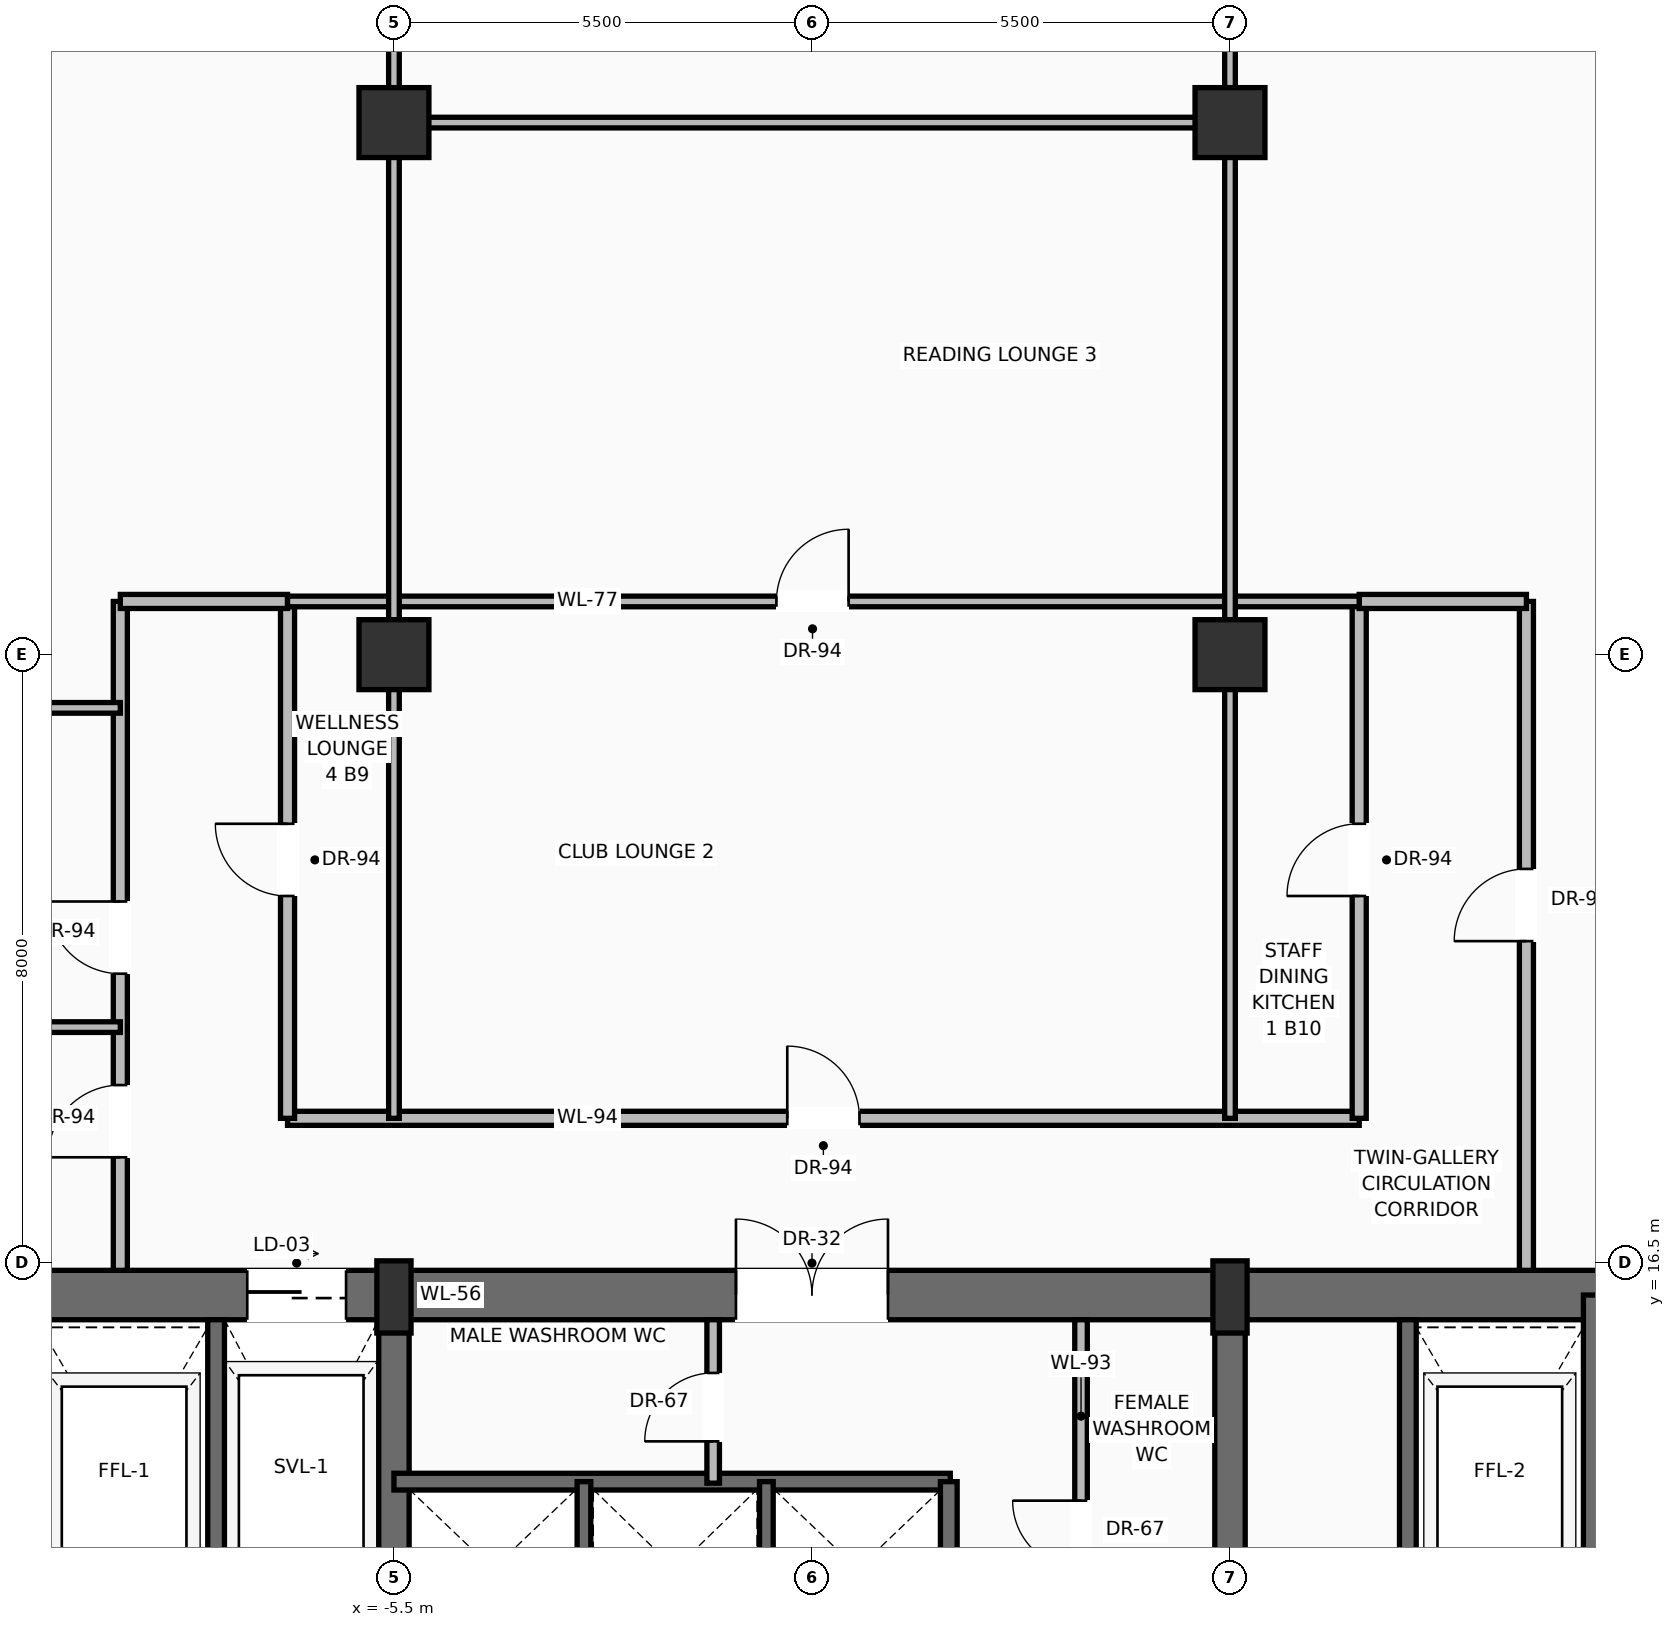
"""IFC4 building model, lengths in metres.
Left out: names, types, materials, properties, quantities, classifications, styles, units other than length and angle.
Written with IfcOpenShell. Run it as: python <this file> out.ifc"""

import sys

from ifc_helpers import new_model, si_unit, direction, frame, frame_2d, origin, origin_2d, place, context, subcontext, project, spatial, rectangle, extrude, source, transform, mapped, element, fill, save


model = new_model("IFC4")
c1 = context("Model", 3, precision=1e-05, world=origin(), true_north=direction((0.0, 1.0)))
c2 = subcontext(c1, "Body", "Model", "MODEL_VIEW")
j1 = project(units=[si_unit("LENGTHUNIT", "METRE"), si_unit("PLANEANGLEUNIT", "RADIAN")], contexts=[c1])
p1 = place(None, origin())
s1 = spatial("IfcSite", under=j1, at=p1, CompositionType="ELEMENT")
p2 = place(p1, origin())
s2 = spatial("IfcBuilding", under=s1, at=p2, CompositionType="ELEMENT")
p3 = place(p2, frame((0.0, 0.0, 155.2)))
s3 = spatial("IfcBuildingStorey", under=s2, at=p3, CompositionType="ELEMENT", Elevation=155.2)
p4 = place(p3, frame((-10.8, 16.075, 0.0), z_axis=(0.0, 0.0, 1.0), x_axis=(1.0, 0.0, 0.0)))
e1 = element("IfcWall", 1, at=p4, inside=s3, PredefinedType="SHEAR", context=c2, shape_type="SweptSolid", body=[
    extrude(rectangle(XDim=21.6, YDim=0.65, at=frame_2d((10.8, 0.0))), origin(), (0.0, 0.0, 1.0), 3.47),
])
p5 = place(p4, frame((3.37, 0.0, 0.0)))
e2 = element("IfcOpeningElement", 2, at=p5, cuts=e1, PredefinedType="OPENING", context=c2, shape_type="SweptSolid", body=[
    extrude(rectangle(XDim=1.3, YDim=2.3, at=frame_2d((0.65, 1.15))), frame((0.0, 0.335, 0.0), z_axis=(0.0, -1.0, 0.0), x_axis=(1.0, 0.0, 0.0)), (0.0, 0.0, 1.0), 0.67),
])
p6 = place(p4, frame((9.8, 0.0, 0.0)))
e3 = element("IfcOpeningElement", 3, at=p6, cuts=e1, PredefinedType="OPENING", context=c2, shape_type="SweptSolid", body=[
    extrude(rectangle(XDim=2.0, YDim=2.4, at=frame_2d((1.0, 1.2))), frame((0.0, 0.335, 0.0), z_axis=(0.0, -1.0, 0.0), x_axis=(1.0, 0.0, 0.0)), (0.0, 0.0, 1.0), 0.67),
])
p7 = place(p3, frame((10.475, 0.525, 0.0), z_axis=(0.0, 0.0, 1.0), x_axis=(0.0, 1.0, 0.0)))
e4 = element("IfcWall", 4, at=p7, inside=s3, PredefinedType="SHEAR", context=c2, shape_type="SweptSolid", body=[
    extrude(rectangle(XDim=15.55, YDim=0.65, at=frame_2d((7.775, 0.0))), origin(), (0.0, 0.0, 1.0), 3.47),
])
p8 = place(p3, frame((-5.5, 0.525, 0.0), z_axis=(0.0, 0.0, 1.0), x_axis=(0.0, 1.0, 0.0)))
e5 = element("IfcWall", 5, at=p8, inside=s3, PredefinedType="SHEAR", context=c2, shape_type="SweptSolid", body=[
    extrude(rectangle(XDim=15.55, YDim=0.4, at=frame_2d((7.775, 0.0))), origin(), (0.0, 0.0, 1.0), 3.47),
])
p9 = place(p8, frame((8.975, 0.0, 0.0)))
e6 = element("IfcOpeningElement", 6, at=p9, cuts=e5, PredefinedType="OPENING", context=c2, shape_type="SweptSolid", body=[
    extrude(rectangle(XDim=1.1, YDim=2.2, at=frame_2d((0.55, 1.1))), frame((0.0, 0.21, 0.0), z_axis=(0.0, -1.0, 0.0), x_axis=(1.0, 0.0, 0.0)), (0.0, 0.0, 1.0), 0.42),
])
p10 = place(p3, frame((5.5, 0.525, 0.0), z_axis=(0.0, 0.0, 1.0), x_axis=(0.0, 1.0, 0.0)))
e7 = element("IfcWall", 7, at=p10, inside=s3, PredefinedType="SHEAR", context=c2, shape_type="SweptSolid", body=[
    extrude(rectangle(XDim=15.55, YDim=0.4, at=frame_2d((7.775, 0.0))), origin(), (0.0, 0.0, 1.0), 3.47),
])
p11 = place(p10, frame((8.975, 0.0, 0.0)))
e8 = element("IfcOpeningElement", 8, at=p11, cuts=e7, PredefinedType="OPENING", context=c2, shape_type="SweptSolid", body=[
    extrude(rectangle(XDim=1.1, YDim=2.2, at=frame_2d((0.55, 1.1))), frame((0.0, 0.21, 0.0), z_axis=(0.0, -1.0, 0.0), x_axis=(1.0, 0.0, 0.0)), (0.0, 0.0, 1.0), 0.42),
])
m1 = source(origin(), c2, "Body", "SweptSolid", [
    extrude(rectangle(XDim=0.45, YDim=0.95, at=origin_2d()), origin(), (0.0, 0.0, 1.0), 3.7),
])
for number, where, z_axis, x_axis in (
    (9, (-5.5, 16.05, 0.0), (0.0, 0.0, 1.0), (1.0, 0.0, 0.0)),
    (10, (5.5, 16.05, 0.0), (0.0, 0.0, 1.0), (1.0, 0.0, 0.0)),
):
    element("IfcColumn", number, at=place(p3, frame(where, z_axis=z_axis, x_axis=x_axis)), inside=s3, PredefinedType="PILASTER", context=c2, shape_type="MappedRepresentation", body=[
        mapped(m1, transform((0.0, 0.0, 0.0), scale=1.0)),
    ])
m2 = source(origin(), c2, "Body", "SweptSolid", [
    extrude(rectangle(XDim=0.92, YDim=0.92, at=origin_2d()), origin(), (0.0, 0.0, 1.0), 3.7),
])
for number, where, z_axis, x_axis in (
    (11, (-5.5, 24.5, 0.0), (0.0, 0.0, 1.0), (1.0, 0.0, 0.0)),
    (12, (5.5, 24.5, 0.0), (0.0, 0.0, 1.0), (1.0, 0.0, 0.0)),
    (13, (-5.5, 31.5, 0.0), (0.0, 0.0, 1.0), (1.0, 0.0, 0.0)),
    (14, (5.5, 31.5, 0.0), (0.0, 0.0, 1.0), (1.0, 0.0, 0.0)),
):
    element("IfcColumn", number, at=place(p3, frame(where, z_axis=z_axis, x_axis=x_axis)), inside=s3, PredefinedType="COLUMN", context=c2, shape_type="MappedRepresentation", body=[
        mapped(m2, transform((0.0, 0.0, 0.0), scale=1.0)),
    ])
for number, where, z_axis, x_axis in (
    (15, (-7.84, 11.87, 0.0), (0.0, 0.0, 1.0), (0.0, 1.0, 0.0)),
    (16, (7.84, 11.87, 0.0), (0.0, 0.0, 1.0), (0.0, 1.0, 0.0)),
):
    element("IfcWall", number, at=place(p3, frame(where, z_axis=z_axis, x_axis=x_axis)), inside=s3, PredefinedType="SOLIDWALL", context=c2, shape_type="SweptSolid", body=[
        extrude(rectangle(XDim=3.88, YDim=0.22, at=frame_2d((1.94, 0.0))), origin(), (0.0, 0.0, 1.0), 3.47),
    ])
p12 = place(p3, frame((-5.5, 13.62, 0.0), z_axis=(0.0, 0.0, 1.0), x_axis=(1.0, 0.0, 0.0)))
e17 = element("IfcWall", 17, at=p12, inside=s3, PredefinedType="SOLIDWALL", context=c2, shape_type="SweptSolid", body=[
    extrude(rectangle(XDim=7.32, YDim=0.22, at=frame_2d((3.66, 0.0))), origin(), (0.0, 0.0, 1.0), 3.47),
])
p13 = place(p3, frame((1.8, 11.32, 0.0), z_axis=(0.0, 0.0, 1.0), x_axis=(0.0, 1.0, 0.0)))
e18 = element("IfcWall", 18, at=p13, inside=s3, PredefinedType="SOLIDWALL", context=c2, shape_type="SweptSolid", body=[
    extrude(rectangle(XDim=2.3, YDim=0.22, at=frame_2d((1.15, 0.0))), origin(), (0.0, 0.0, 1.0), 3.47),
])
for number, where, z_axis, x_axis in (
    (19, (-3.0, 11.32, 0.0), (0.0, 0.0, 1.0), (0.0, 1.0, 0.0)),
    (20, (-0.6, 11.32, 0.0), (0.0, 0.0, 1.0), (0.0, 1.0, 0.0)),
):
    element("IfcWall", number, at=place(p3, frame(where, z_axis=z_axis, x_axis=x_axis)), inside=s3, PredefinedType="SOLIDWALL", context=c2, shape_type="SweptSolid", body=[
        extrude(rectangle(XDim=2.3, YDim=0.18, at=frame_2d((1.15, 0.0))), origin(), (0.0, 0.0, 1.0), 3.47),
    ])
p14 = place(p3, frame((-1.3, 13.6, 0.0), z_axis=(0.0, 0.0, 1.0), x_axis=(0.0, 1.0, 0.0)))
e21 = element("IfcWall", 21, at=p14, inside=s3, PredefinedType="PARTITIONING", context=c2, shape_type="SweptSolid", body=[
    extrude(rectangle(XDim=2.15, YDim=0.165, at=frame_2d((1.075, 0.0))), origin(), (0.0, 0.0, 1.0), 3.462),
])
p15 = place(p14, frame((0.55, 0.0, 0.0)))
e22 = element("IfcOpeningElement", 22, at=p15, cuts=e21, PredefinedType="OPENING", context=c2, shape_type="SweptSolid", body=[
    extrude(rectangle(XDim=0.9, YDim=2.1, at=frame_2d((0.45, 1.05))), frame((0.0, 0.093, 0.0), z_axis=(0.0, -1.0, 0.0), x_axis=(1.0, 0.0, 0.0)), (0.0, 0.0, 1.0), 0.185),
])
p16 = place(p3, frame((3.54, 11.22, 0.0), z_axis=(0.0, 0.0, 1.0), x_axis=(0.0, 1.0, 0.0)))
e23 = element("IfcWall", 23, at=p16, inside=s3, PredefinedType="PARTITIONING", context=c2, shape_type="SweptSolid", body=[
    extrude(rectangle(XDim=4.53, YDim=0.165, at=frame_2d((2.265, 0.0))), origin(), (0.0, 0.0, 1.0), 3.462),
])
p17 = place(p16, frame((1.25, 0.0, 0.0)))
e24 = element("IfcOpeningElement", 24, at=p17, cuts=e23, PredefinedType="OPENING", context=c2, shape_type="SweptSolid", body=[
    extrude(rectangle(XDim=0.9, YDim=2.1, at=frame_2d((0.45, 1.05))), frame((0.0, 0.093, 0.0), z_axis=(0.0, -1.0, 0.0), x_axis=(1.0, 0.0, 0.0)), (0.0, 0.0, 1.0), 0.185),
])
p18 = place(p3, frame((-6.9, 18.4, 0.0), z_axis=(0.0, 0.0, 1.0), x_axis=(1.0, 0.0, 0.0)))
e25 = element("IfcWall", 25, at=p18, inside=s3, PredefinedType="PARTITIONING", context=c2, shape_type="SweptSolid", body=[
    extrude(rectangle(XDim=14.1, YDim=0.185, at=frame_2d((7.05, 0.0))), origin(), (0.0, 0.0, 1.0), 2.846),
])
p19 = place(p18, frame((6.575, 0.0, 0.0)))
e26 = element("IfcOpeningElement", 26, at=p19, cuts=e25, PredefinedType="OPENING", context=c2, shape_type="SweptSolid", body=[
    extrude(rectangle(XDim=0.95, YDim=2.2, at=frame_2d((0.475, 1.1))), frame((0.0, 0.103, 0.0), z_axis=(0.0, -1.0, 0.0), x_axis=(1.0, 0.0, 0.0)), (0.0, 0.0, 1.0), 0.205),
])
p20 = place(p3, frame((-6.9, 18.4, 0.0), z_axis=(0.0, 0.0, 1.0), x_axis=(0.0, 1.0, 0.0)))
e27 = element("IfcWall", 27, at=p20, inside=s3, PredefinedType="PARTITIONING", context=c2, shape_type="SweptSolid", body=[
    extrude(rectangle(XDim=6.8, YDim=0.185, at=frame_2d((3.4, 0.0))), origin(), (0.0, 0.0, 1.0), 2.846),
])
p21 = place(p20, frame((2.925, 0.0, 0.0)))
e28 = element("IfcOpeningElement", 28, at=p21, cuts=e27, PredefinedType="OPENING", context=c2, shape_type="SweptSolid", body=[
    extrude(rectangle(XDim=0.95, YDim=2.2, at=frame_2d((0.475, 1.1))), frame((0.0, 0.103, 0.0), z_axis=(0.0, -1.0, 0.0), x_axis=(1.0, 0.0, 0.0)), (0.0, 0.0, 1.0), 0.205),
])
p22 = place(p3, frame((7.2, 18.4, 0.0), z_axis=(0.0, 0.0, 1.0), x_axis=(0.0, 1.0, 0.0)))
e29 = element("IfcWall", 29, at=p22, inside=s3, PredefinedType="PARTITIONING", context=c2, shape_type="SweptSolid", body=[
    extrude(rectangle(XDim=6.8, YDim=0.185, at=frame_2d((3.4, 0.0))), origin(), (0.0, 0.0, 1.0), 2.846),
])
p23 = place(p22, frame((2.925, 0.0, 0.0)))
e30 = element("IfcOpeningElement", 30, at=p23, cuts=e29, PredefinedType="OPENING", context=c2, shape_type="SweptSolid", body=[
    extrude(rectangle(XDim=0.95, YDim=2.2, at=frame_2d((0.475, 1.1))), frame((0.0, 0.103, 0.0), z_axis=(0.0, -1.0, 0.0), x_axis=(1.0, 0.0, 0.0)), (0.0, 0.0, 1.0), 0.205),
])
p24 = place(p3, frame((-9.1, 16.4, 0.0), z_axis=(0.0, 0.0, 1.0), x_axis=(0.0, 1.0, 0.0)))
e31 = element("IfcWall", 31, at=p24, inside=s3, PredefinedType="PARTITIONING", context=c2, shape_type="SweptSolid", body=[
    extrude(rectangle(XDim=8.8, YDim=0.185, at=frame_2d((4.4, 0.0))), origin(), (0.0, 0.0, 1.0), 2.846),
])
p25 = place(p24, frame((3.903, 0.0, 0.0)))
e32 = element("IfcOpeningElement", 32, at=p25, cuts=e31, PredefinedType="OPENING", context=c2, shape_type="SweptSolid", body=[
    extrude(rectangle(XDim=0.95, YDim=2.2, at=frame_2d((0.475, 1.1))), frame((0.0, 0.103, 0.0), z_axis=(0.0, -1.0, 0.0), x_axis=(1.0, 0.0, 0.0)), (0.0, 0.0, 1.0), 0.205),
])
p26 = place(p24, frame((1.487, 0.0, 0.0)))
e33 = element("IfcOpeningElement", 33, at=p26, cuts=e31, PredefinedType="OPENING", context=c2, shape_type="SweptSolid", body=[
    extrude(rectangle(XDim=0.95, YDim=2.2, at=frame_2d((0.475, 1.1))), frame((0.0, 0.103, 0.0), z_axis=(0.0, -1.0, 0.0), x_axis=(1.0, 0.0, 0.0)), (0.0, 0.0, 1.0), 0.205),
])
p27 = place(p3, frame((9.4, 16.4, 0.0), z_axis=(0.0, 0.0, 1.0), x_axis=(0.0, 1.0, 0.0)))
e34 = element("IfcWall", 34, at=p27, inside=s3, PredefinedType="PARTITIONING", context=c2, shape_type="SweptSolid", body=[
    extrude(rectangle(XDim=8.8, YDim=0.185, at=frame_2d((4.4, 0.0))), origin(), (0.0, 0.0, 1.0), 2.846),
])
p28 = place(p27, frame((4.331, 0.0, 0.0)))
e35 = element("IfcOpeningElement", 35, at=p28, cuts=e34, PredefinedType="OPENING", context=c2, shape_type="SweptSolid", body=[
    extrude(rectangle(XDim=0.95, YDim=2.2, at=frame_2d((0.475, 1.1))), frame((0.0, 0.103, 0.0), z_axis=(0.0, -1.0, 0.0), x_axis=(1.0, 0.0, 0.0)), (0.0, 0.0, 1.0), 0.205),
])
p29 = place(p3, frame((-9.1, 25.2, 0.0), z_axis=(0.0, 0.0, 1.0), x_axis=(1.0, 0.0, 0.0)))
e36 = element("IfcWall", 36, at=p29, inside=s3, PredefinedType="PARTITIONING", context=c2, shape_type="SweptSolid", body=[
    extrude(rectangle(XDim=2.2, YDim=0.185, at=frame_2d((1.1, 0.0))), origin(), (0.0, 0.0, 1.0), 3.462),
])
p30 = place(p3, frame((7.2, 25.2, 0.0), z_axis=(0.0, 0.0, 1.0), x_axis=(1.0, 0.0, 0.0)))
e37 = element("IfcWall", 37, at=p30, inside=s3, PredefinedType="PARTITIONING", context=c2, shape_type="SweptSolid", body=[
    extrude(rectangle(XDim=2.2, YDim=0.185, at=frame_2d((1.1, 0.0))), origin(), (0.0, 0.0, 1.0), 3.462),
])
p31 = place(p3, frame((-6.9, 25.2, 0.0), z_axis=(0.0, 0.0, 1.0), x_axis=(1.0, 0.0, 0.0)))
e38 = element("IfcWall", 38, at=p31, inside=s3, PredefinedType="PARTITIONING", context=c2, shape_type="SweptSolid", body=[
    extrude(rectangle(XDim=14.1, YDim=0.14, at=frame_2d((7.05, 0.0))), origin(), (0.0, 0.0, 1.0), 3.462),
])
p32 = place(p31, frame((6.432, 0.0, 0.0)))
e39 = element("IfcOpeningElement", 39, at=p32, cuts=e38, PredefinedType="OPENING", context=c2, shape_type="SweptSolid", body=[
    extrude(rectangle(XDim=0.95, YDim=2.2, at=frame_2d((0.475, 1.1))), frame((0.0, 0.08, 0.0), z_axis=(0.0, -1.0, 0.0), x_axis=(1.0, 0.0, 0.0)), (0.0, 0.0, 1.0), 0.16),
])
for number, where, z_axis, x_axis in (
    (40, (-5.5, 18.4, 0.0), (0.0, 0.0, 1.0), (0.0, 1.0, 0.0)),
    (41, (5.5, 18.4, 0.0), (0.0, 0.0, 1.0), (0.0, 1.0, 0.0)),
):
    element("IfcWall", number, at=place(p3, frame(where, z_axis=z_axis, x_axis=x_axis)), inside=s3, PredefinedType="PARTITIONING", context=c2, shape_type="SweptSolid", body=[
        extrude(rectangle(XDim=14.1, YDim=0.14, at=frame_2d((7.05, 0.0))), origin(), (0.0, 0.0, 1.0), 2.846),
    ])
p33 = place(p3, frame((-5.5, 31.5, 0.0), z_axis=(0.0, 0.0, 1.0), x_axis=(1.0, 0.0, 0.0)))
e42 = element("IfcWall", 42, at=p33, inside=s3, PredefinedType="PARTITIONING", context=c2, shape_type="SweptSolid", body=[
    extrude(rectangle(XDim=11.0, YDim=0.14, at=frame_2d((5.5, 0.0))), origin(), (0.0, 0.0, 1.0), 2.846),
])
p34 = place(p3, frame((-19.199, 19.6, 0.0), z_axis=(0.0, 0.0, 1.0), x_axis=(1.0, 0.0, 0.0)))
e43 = element("IfcWall", 43, at=p34, inside=s3, PredefinedType="PARTITIONING", context=c2, shape_type="SweptSolid", body=[
    extrude(rectangle(XDim=10.099, YDim=0.14, at=frame_2d((5.049, 0.0))), origin(), (0.0, 0.0, 1.0), 3.049),
])
p35 = place(p3, frame((-16.506, 23.8, 0.0), z_axis=(0.0, 0.0, 1.0), x_axis=(1.0, 0.0, 0.0)))
e44 = element("IfcWall", 44, at=p35, inside=s3, PredefinedType="PARTITIONING", context=c2, shape_type="SweptSolid", body=[
    extrude(rectangle(XDim=7.406, YDim=0.14, at=frame_2d((3.703, 0.0))), origin(), (0.0, 0.0, 1.0), 3.462),
])
m3 = source(origin(), c2, "Body", "SweptSolid", [
    extrude(rectangle(XDim=1.3, YDim=2.3, at=frame_2d((0.65, 1.15))), frame((0.0, 0.025, 0.0), z_axis=(0.0, -1.0, 0.0), x_axis=(1.0, 0.0, 0.0)), (0.0, 0.0, 1.0), 0.05),
])
p36 = place(p5, origin())
e45 = element("IfcDoor", 45, at=p36, inside=s3, OperationType="SLIDING_TO_RIGHT", PredefinedType="DOOR", context=c2, shape_type="MappedRepresentation", body=[
    mapped(m3, transform((0.0, 0.0, 0.0), scale=1.0)),
])
fill(e2, e45)
m4 = source(origin(), c2, "Body", "SweptSolid", [
    extrude(rectangle(XDim=2.0, YDim=2.4, at=frame_2d((1.0, 1.2))), frame((0.0, 0.025, 0.0), z_axis=(0.0, -1.0, 0.0), x_axis=(1.0, 0.0, 0.0)), (0.0, 0.0, 1.0), 0.05),
])
p37 = place(p6, origin())
e46 = element("IfcDoor", 46, at=p37, inside=s3, OperationType="DOUBLE_DOOR_SINGLE_SWING", PredefinedType="DOOR", context=c2, shape_type="MappedRepresentation", body=[
    mapped(m4, transform((0.0, 0.0, 0.0), scale=1.0)),
])
fill(e3, e46)
m5 = source(origin(), c2, "Body", "SweptSolid", [
    extrude(rectangle(XDim=0.9, YDim=2.1, at=frame_2d((0.45, 1.05))), frame((0.0, 0.025, 0.0), z_axis=(0.0, -1.0, 0.0), x_axis=(1.0, 0.0, 0.0)), (0.0, 0.0, 1.0), 0.05),
])
p38 = place(p15, origin())
e47 = element("IfcDoor", 47, at=p38, inside=s3, OperationType="SINGLE_SWING_LEFT", PredefinedType="DOOR", context=c2, shape_type="MappedRepresentation", body=[
    mapped(m5, transform((0.0, 0.0, 0.0), scale=1.0)),
])
fill(e22, e47)
p39 = place(p17, origin())
e48 = element("IfcDoor", 48, at=p39, inside=s3, OperationType="SINGLE_SWING_RIGHT", PredefinedType="DOOR", context=c2, shape_type="MappedRepresentation", body=[
    mapped(m5, transform((0.0, 0.0, 0.0), scale=1.0)),
])
fill(e24, e48)
m6 = source(origin(), c2, "Body", "SweptSolid", [
    extrude(rectangle(XDim=0.95, YDim=2.2, at=frame_2d((0.475, 1.1))), frame((0.0, 0.025, 0.0), z_axis=(0.0, -1.0, 0.0), x_axis=(1.0, 0.0, 0.0)), (0.0, 0.0, 1.0), 0.05),
])
p40 = place(p19, origin())
e49 = element("IfcDoor", 49, at=p40, inside=s3, OperationType="SINGLE_SWING_LEFT", PredefinedType="DOOR", context=c2, shape_type="MappedRepresentation", body=[
    mapped(m6, transform((0.0, 0.0, 0.0), scale=1.0)),
])
fill(e26, e49)
p41 = place(p25, origin())
e50 = element("IfcDoor", 50, at=p41, inside=s3, OperationType="SINGLE_SWING_RIGHT", PredefinedType="DOOR", context=c2, shape_type="MappedRepresentation", body=[
    mapped(m6, transform((0.0, 0.0, 0.0), scale=1.0)),
])
fill(e32, e50)
p42 = place(p28, origin())
e51 = element("IfcDoor", 51, at=p42, inside=s3, OperationType="SINGLE_SWING_LEFT", PredefinedType="DOOR", context=c2, shape_type="MappedRepresentation", body=[
    mapped(m6, transform((0.0, 0.0, 0.0), scale=1.0)),
])
fill(e35, e51)
p43 = place(p26, origin())
e52 = element("IfcDoor", 52, at=p43, inside=s3, OperationType="SINGLE_SWING_LEFT", PredefinedType="DOOR", context=c2, shape_type="MappedRepresentation", body=[
    mapped(m6, transform((0.0, 0.0, 0.0), scale=1.0)),
])
fill(e33, e52)
p44 = place(p21, origin())
e53 = element("IfcDoor", 53, at=p44, inside=s3, OperationType="SINGLE_SWING_RIGHT", PredefinedType="DOOR", context=c2, shape_type="MappedRepresentation", body=[
    mapped(m6, transform((0.0, 0.0, 0.0), scale=1.0)),
])
fill(e28, e53)
p45 = place(p23, origin())
e54 = element("IfcDoor", 54, at=p45, inside=s3, OperationType="SINGLE_SWING_LEFT", PredefinedType="DOOR", context=c2, shape_type="MappedRepresentation", body=[
    mapped(m6, transform((0.0, 0.0, 0.0), scale=1.0)),
])
fill(e30, e54)
p46 = place(p32, origin())
e55 = element("IfcDoor", 55, at=p46, inside=s3, OperationType="SINGLE_SWING_RIGHT", PredefinedType="DOOR", context=c2, shape_type="MappedRepresentation", body=[
    mapped(m6, transform((0.0, 0.0, 0.0), scale=1.0)),
])
fill(e39, e55)
save(model, sys.argv[1])
